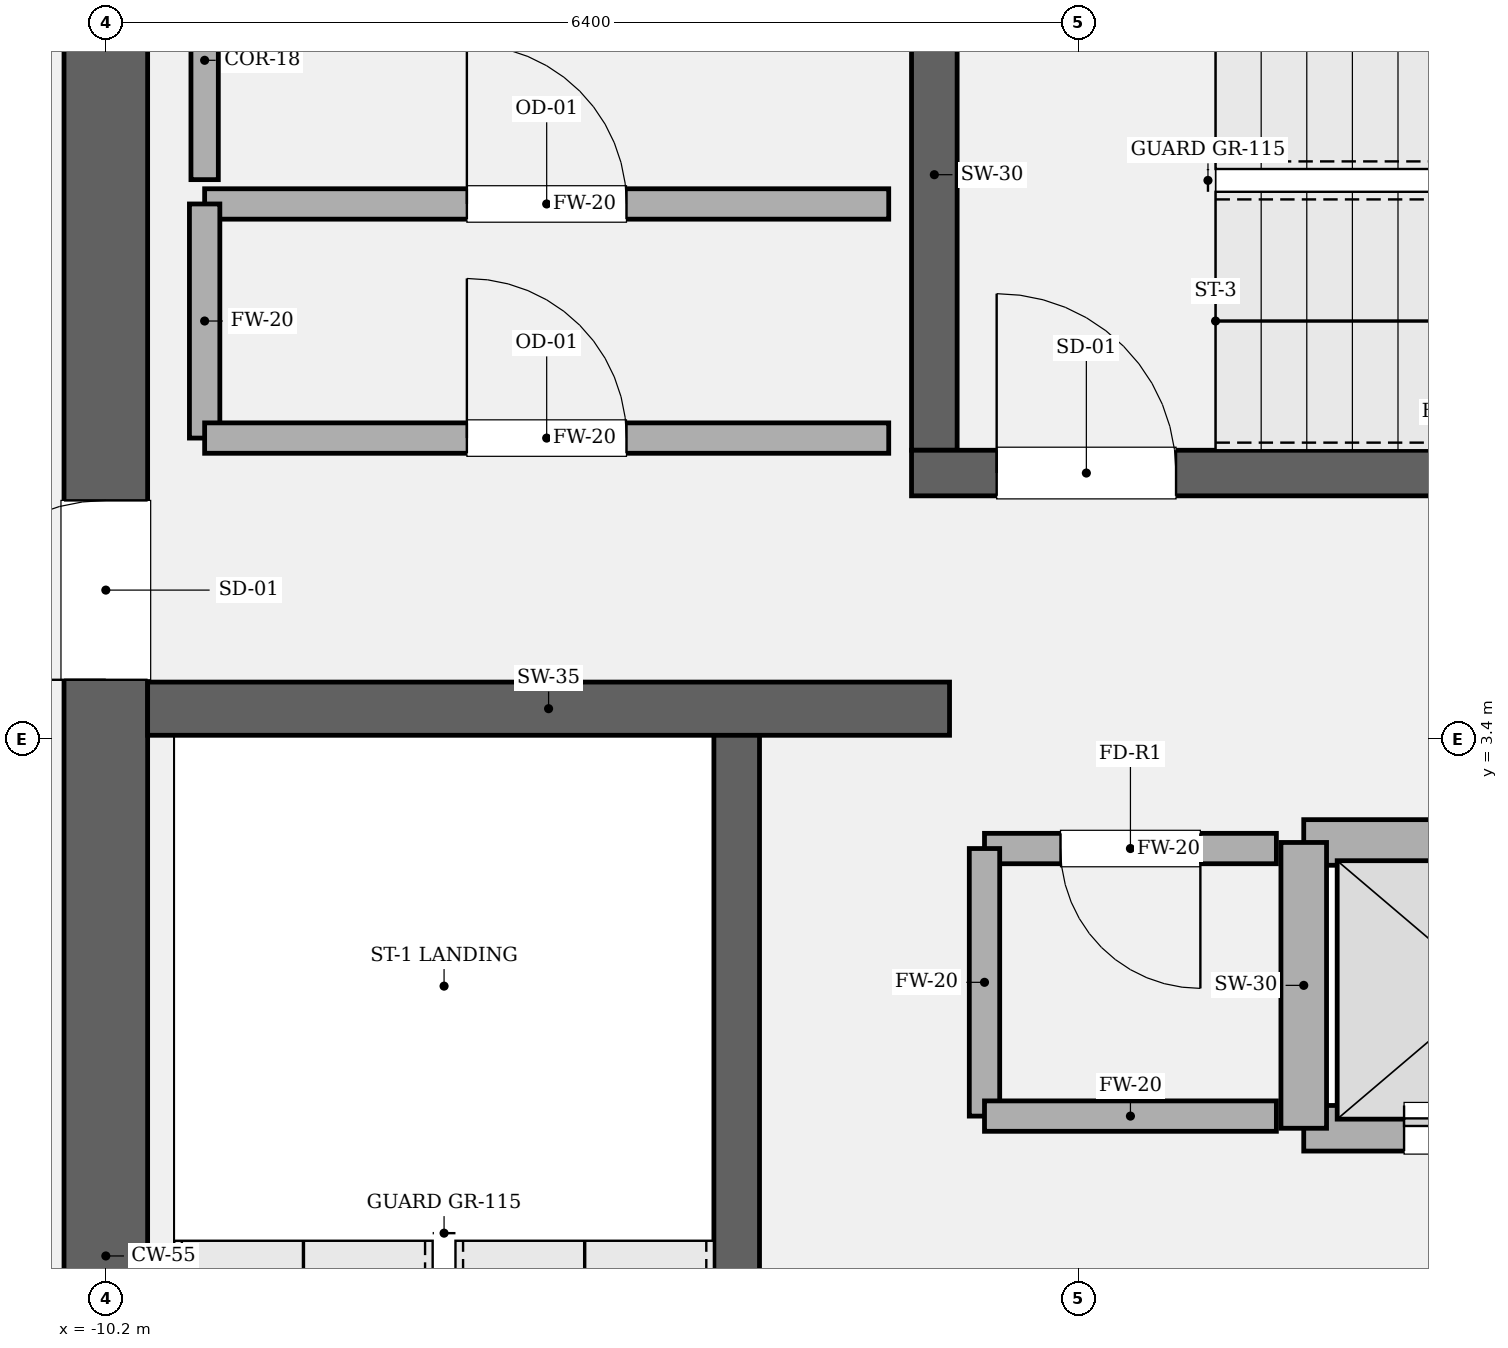
"""IFC4 building model, lengths in metres.
Left out: names, types, materials, properties, quantities, classifications, styles, units other than length and angle.
Written with IfcOpenShell. Run it as: python <this file> out.ifc"""

import sys

from ifc_helpers import new_model, si_unit, direction, frame, frame_2d, origin, place, context, subcontext, project, spatial, rectangle, extrude, element, fill, save


model = new_model("IFC4")
c1 = context("Model", 3, precision=1e-05, world=origin(), true_north=direction((0.0, 1.0)))
c2 = subcontext(c1, "Body", "Model", "MODEL_VIEW")
j1 = project(units=[si_unit("LENGTHUNIT", "METRE"), si_unit("PLANEANGLEUNIT", "RADIAN")], contexts=[c1])
p1 = place(None, origin())
s1 = spatial("IfcSite", under=j1, at=p1, CompositionType="ELEMENT")
p2 = place(p1, origin())
s2 = spatial("IfcBuilding", under=s1, at=p2, CompositionType="ELEMENT")
p3 = place(p2, frame((0.0, 0.0, 283.8)))
s3 = spatial("IfcBuildingStorey", under=s2, at=p3, CompositionType="ELEMENT", Elevation=283.8)
p4 = place(p3, frame((-10.2, -8.925, 0.0), z_axis=(0.0, 0.0, 1.0), x_axis=(0.0, 1.0, 0.0)))
e1 = element("IfcWall", 1, at=p4, inside=s3, PredefinedType="SHEAR", context=c2, shape_type="SweptSolid", body=[
    extrude(rectangle(XDim=17.85, YDim=0.55, at=frame_2d((8.925, 0.0))), origin(), (0.0, 0.0, 1.0), 4.2),
])
p5 = place(p4, frame((12.715, 0.0, 0.0)))
e2 = element("IfcOpeningElement", 2, at=p5, cuts=e1, PredefinedType="OPENING", context=c2, shape_type="SweptSolid", body=[
    extrude(rectangle(XDim=1.18, YDim=2.2, at=frame_2d((0.59, 1.1))), frame((0.0, 0.285, 0.0), z_axis=(0.0, -1.0, 0.0), x_axis=(1.0, 0.0, 0.0)), (0.0, 0.0, 1.0), 0.57),
])
p6 = place(p3, frame((-6.05, -5.5, 0.0), z_axis=(0.0, 0.0, 1.0), x_axis=(0.0, 1.0, 0.0)))
e3 = element("IfcWall", 3, at=p6, inside=s3, PredefinedType="SOLIDWALL", context=c2, shape_type="SweptSolid", body=[
    extrude(rectangle(XDim=8.95, YDim=0.3, at=frame_2d((4.475, 0.0))), origin(), (0.0, 0.0, 1.0), 4.2),
])
p7 = place(p3, frame((-4.75, 5.3, 0.0), z_axis=(0.0, 0.0, 1.0), x_axis=(0.0, 1.0, 0.0)))
e4 = element("IfcWall", 4, at=p7, inside=s3, PredefinedType="SOLIDWALL", context=c2, shape_type="SweptSolid", body=[
    extrude(rectangle(XDim=3.625, YDim=0.3, at=frame_2d((1.812, 0.0))), origin(), (0.0, 0.0, 1.0), 4.2),
])
p8 = place(p3, frame((-4.9, 5.15, 0.0), z_axis=(0.0, 0.0, 1.0), x_axis=(1.0, 0.0, 0.0)))
e5 = element("IfcWall", 5, at=p8, inside=s3, PredefinedType="SOLIDWALL", context=c2, shape_type="SweptSolid", body=[
    extrude(rectangle(XDim=9.8, YDim=0.3, at=frame_2d((4.9, 0.0))), origin(), (0.0, 0.0, 1.0), 4.2),
])
p9 = place(p8, frame((0.56, 0.0, 0.0)))
e6 = element("IfcOpeningElement", 6, at=p9, cuts=e5, PredefinedType="OPENING", context=c2, shape_type="SweptSolid", body=[
    extrude(rectangle(XDim=1.18, YDim=2.2, at=frame_2d((0.59, 1.1))), frame((0.0, 0.16, 0.0), z_axis=(0.0, -1.0, 0.0), x_axis=(1.0, 0.0, 0.0)), (0.0, 0.0, 1.0), 0.32),
])
p10 = place(p3, frame((-9.925, 3.6, 0.0), z_axis=(0.0, 0.0, 1.0), x_axis=(1.0, 0.0, 0.0)))
e7 = element("IfcWall", 7, at=p10, inside=s3, PredefinedType="SOLIDWALL", context=c2, shape_type="SweptSolid", body=[
    extrude(rectangle(XDim=5.275, YDim=0.35, at=frame_2d((2.638, 0.0))), origin(), (0.0, 0.0, 1.0), 4.2),
])
p11 = place(p3, frame((-2.32, 0.84, 0.0), z_axis=(0.0, 0.0, 1.0), x_axis=(1.0, 0.0, 0.0)))
e8 = element("IfcWall", 8, at=p11, inside=s3, PredefinedType="SOLIDWALL", context=c2, shape_type="SweptSolid", body=[
    extrude(rectangle(XDim=4.64, YDim=0.3, at=frame_2d((2.32, 0.0))), origin(), (0.0, 0.0, 1.0), 4.0),
])
p12 = place(p11, frame((0.66, 0.0, 0.0)))
e9 = element("IfcOpeningElement", 9, at=p12, cuts=e8, PredefinedType="OPENING", context=c2, shape_type="SweptSolid", body=[
    extrude(rectangle(XDim=1.12, YDim=2.25, at=frame_2d((0.56, 1.125))), frame((0.0, 0.16, 0.0), z_axis=(0.0, -1.0, 0.0), x_axis=(1.0, 0.0, 0.0)), (0.0, 0.0, 1.0), 0.32),
])
p13 = place(p11, frame((2.86, 0.0, 0.0)))
e10 = element("IfcOpeningElement", 10, at=p13, cuts=e8, PredefinedType="OPENING", context=c2, shape_type="SweptSolid", body=[
    extrude(rectangle(XDim=1.12, YDim=2.25, at=frame_2d((0.56, 1.125))), frame((0.0, 0.16, 0.0), z_axis=(0.0, -1.0, 0.0), x_axis=(1.0, 0.0, 0.0)), (0.0, 0.0, 1.0), 0.32),
])
p14 = place(p3, frame((-2.32, 2.72, 0.0), z_axis=(0.0, 0.0, 1.0), x_axis=(1.0, 0.0, 0.0)))
e11 = element("IfcWall", 11, at=p14, inside=s3, PredefinedType="SOLIDWALL", context=c2, shape_type="SweptSolid", body=[
    extrude(rectangle(XDim=4.64, YDim=0.3, at=frame_2d((2.32, 0.0))), origin(), (0.0, 0.0, 1.0), 4.0),
])
p15 = place(p3, frame((-2.32, 0.84, 0.0), z_axis=(0.0, 0.0, 1.0), x_axis=(0.0, 1.0, 0.0)))
e12 = element("IfcWall", 12, at=p15, inside=s3, PredefinedType="SOLIDWALL", context=c2, shape_type="SweptSolid", body=[
    extrude(rectangle(XDim=1.88, YDim=0.3, at=frame_2d((0.94, 0.0))), origin(), (0.0, 0.0, 1.0), 4.0),
])
p16 = place(p3, frame((-2.5, 2.68, 0.0), z_axis=(0.0, 0.0, 1.0), x_axis=(-1.0, 0.0, 0.0)))
e13 = element("IfcWall", 13, at=p16, inside=s3, PredefinedType="SOLIDWALL", context=c2, shape_type="SweptSolid", body=[
    extrude(rectangle(XDim=1.92, YDim=0.2, at=frame_2d((0.96, 0.0))), origin(), (0.0, 0.0, 1.0), 4.0),
])
p17 = place(p16, frame((0.5, 0.0, 0.0)))
e14 = element("IfcOpeningElement", 14, at=p17, cuts=e13, PredefinedType="OPENING", context=c2, shape_type="SweptSolid", body=[
    extrude(rectangle(XDim=0.92, YDim=2.1, at=frame_2d((0.46, 1.05))), frame((0.0, 0.11, 0.0), z_axis=(0.0, -1.0, 0.0), x_axis=(1.0, 0.0, 0.0)), (0.0, 0.0, 1.0), 0.22),
])
p18 = place(p3, frame((-4.42, 2.68, 0.0), z_axis=(0.0, 0.0, 1.0), x_axis=(0.0, -1.0, 0.0)))
e15 = element("IfcWall", 15, at=p18, inside=s3, PredefinedType="SOLIDWALL", context=c2, shape_type="SweptSolid", body=[
    extrude(rectangle(XDim=1.76, YDim=0.2, at=frame_2d((0.88, 0.0))), origin(), (0.0, 0.0, 1.0), 4.0),
])
p19 = place(p3, frame((-4.42, 0.92, 0.0), z_axis=(0.0, 0.0, 1.0), x_axis=(1.0, 0.0, 0.0)))
e16 = element("IfcWall", 16, at=p19, inside=s3, PredefinedType="SOLIDWALL", context=c2, shape_type="SweptSolid", body=[
    extrude(rectangle(XDim=1.92, YDim=0.2, at=frame_2d((0.96, 0.0))), origin(), (0.0, 0.0, 1.0), 4.0),
])
p20 = place(p3, frame((-5.05, 6.92, 0.0), z_axis=(0.0, 0.0, 1.0), x_axis=(-1.0, 0.0, 0.0)))
e17 = element("IfcWall", 17, at=p20, inside=s3, PredefinedType="SOLIDWALL", context=c2, shape_type="SweptSolid", body=[
    extrude(rectangle(XDim=4.5, YDim=0.2, at=frame_2d((2.25, 0.0))), origin(), (0.0, 0.0, 1.0), 4.0),
])
p21 = place(p20, frame((1.725, 0.0, 0.0)))
e18 = element("IfcOpeningElement", 18, at=p21, cuts=e17, PredefinedType="OPENING", context=c2, shape_type="SweptSolid", body=[
    extrude(rectangle(XDim=1.05, YDim=2.2, at=frame_2d((0.525, 1.1))), frame((0.0, 0.11, 0.0), z_axis=(0.0, -1.0, 0.0), x_axis=(1.0, 0.0, 0.0)), (0.0, 0.0, 1.0), 0.22),
])
p22 = place(p3, frame((-9.55, 6.92, 0.0), z_axis=(0.0, 0.0, 1.0), x_axis=(0.0, -1.0, 0.0)))
e19 = element("IfcWall", 19, at=p22, inside=s3, PredefinedType="SOLIDWALL", context=c2, shape_type="SweptSolid", body=[
    extrude(rectangle(XDim=1.54, YDim=0.2, at=frame_2d((0.77, 0.0))), origin(), (0.0, 0.0, 1.0), 4.0),
])
p23 = place(p3, frame((-9.55, 5.38, 0.0), z_axis=(0.0, 0.0, 1.0), x_axis=(1.0, 0.0, 0.0)))
e20 = element("IfcWall", 20, at=p23, inside=s3, PredefinedType="SOLIDWALL", context=c2, shape_type="SweptSolid", body=[
    extrude(rectangle(XDim=4.5, YDim=0.2, at=frame_2d((2.25, 0.0))), origin(), (0.0, 0.0, 1.0), 4.0),
])
p24 = place(p23, frame((1.725, 0.0, 0.0)))
e21 = element("IfcOpeningElement", 21, at=p24, cuts=e20, PredefinedType="OPENING", context=c2, shape_type="SweptSolid", body=[
    extrude(rectangle(XDim=1.05, YDim=2.2, at=frame_2d((0.525, 1.1))), frame((0.0, 0.11, 0.0), z_axis=(0.0, -1.0, 0.0), x_axis=(1.0, 0.0, 0.0)), (0.0, 0.0, 1.0), 0.22),
])
p25 = place(p3, frame((-9.55, 8.65, 0.0), z_axis=(0.0, 0.0, 1.0), x_axis=(0.0, -1.0, 0.0)))
e22 = element("IfcWall", 22, at=p25, inside=s3, PredefinedType="PARTITIONING", context=c2, shape_type="SweptSolid", body=[
    extrude(rectangle(XDim=1.57, YDim=0.18, at=frame_2d((0.785, 0.0))), origin(), (0.0, 0.0, 1.0), 4.0),
])
p26 = place(p9, origin())
e23 = element("IfcDoor", 23, at=p26, inside=s3, OperationType="SINGLE_SWING_LEFT", PredefinedType="DOOR", context=c2, shape_type="SweptSolid", body=[
    extrude(rectangle(XDim=1.18, YDim=2.2, at=frame_2d((0.59, 1.1))), frame((0.0, 0.025, 0.0), z_axis=(0.0, -1.0, 0.0), x_axis=(1.0, 0.0, 0.0)), (0.0, 0.0, 1.0), 0.05),
])
fill(e6, e23)
p27 = place(p5, origin())
e24 = element("IfcDoor", 24, at=p27, inside=s3, OperationType="SINGLE_SWING_LEFT", PredefinedType="DOOR", context=c2, shape_type="SweptSolid", body=[
    extrude(rectangle(XDim=1.18, YDim=2.2, at=frame_2d((0.59, 1.1))), frame((0.0, 0.025, 0.0), z_axis=(0.0, -1.0, 0.0), x_axis=(1.0, 0.0, 0.0)), (0.0, 0.0, 1.0), 0.05),
])
fill(e2, e24)
p28 = place(p12, origin())
e25 = element("IfcDoor", 25, at=p28, inside=s3, OperationType="DOUBLE_DOOR_SLIDING", PredefinedType="DOOR", context=c2, shape_type="SweptSolid", body=[
    extrude(rectangle(XDim=1.12, YDim=2.25, at=frame_2d((0.56, 1.125))), frame((0.0, 0.025, 0.0), z_axis=(0.0, -1.0, 0.0), x_axis=(1.0, 0.0, 0.0)), (0.0, 0.0, 1.0), 0.05),
])
fill(e9, e25)
p29 = place(p17, origin())
e26 = element("IfcDoor", 26, at=p29, inside=s3, OperationType="SINGLE_SWING_LEFT", PredefinedType="DOOR", context=c2, shape_type="SweptSolid", body=[
    extrude(rectangle(XDim=0.92, YDim=2.1, at=frame_2d((0.46, 1.05))), frame((0.0, 0.025, 0.0), z_axis=(0.0, -1.0, 0.0), x_axis=(1.0, 0.0, 0.0)), (0.0, 0.0, 1.0), 0.05),
])
fill(e14, e26)
p30 = place(p24, origin())
e27 = element("IfcDoor", 27, at=p30, inside=s3, OperationType="SINGLE_SWING_LEFT", PredefinedType="DOOR", context=c2, shape_type="SweptSolid", body=[
    extrude(rectangle(XDim=1.05, YDim=2.2, at=frame_2d((0.525, 1.1))), frame((0.0, 0.025, 0.0), z_axis=(0.0, -1.0, 0.0), x_axis=(1.0, 0.0, 0.0)), (0.0, 0.0, 1.0), 0.05),
])
fill(e21, e27)
p31 = place(p21, origin())
e28 = element("IfcDoor", 28, at=p31, inside=s3, OperationType="SINGLE_SWING_RIGHT", PredefinedType="DOOR", context=c2, shape_type="SweptSolid", body=[
    extrude(rectangle(XDim=1.05, YDim=2.2, at=frame_2d((0.525, 1.1))), frame((0.0, 0.025, 0.0), z_axis=(0.0, -1.0, 0.0), x_axis=(1.0, 0.0, 0.0)), (0.0, 0.0, 1.0), 0.05),
])
fill(e18, e28)
save(model, sys.argv[1])
